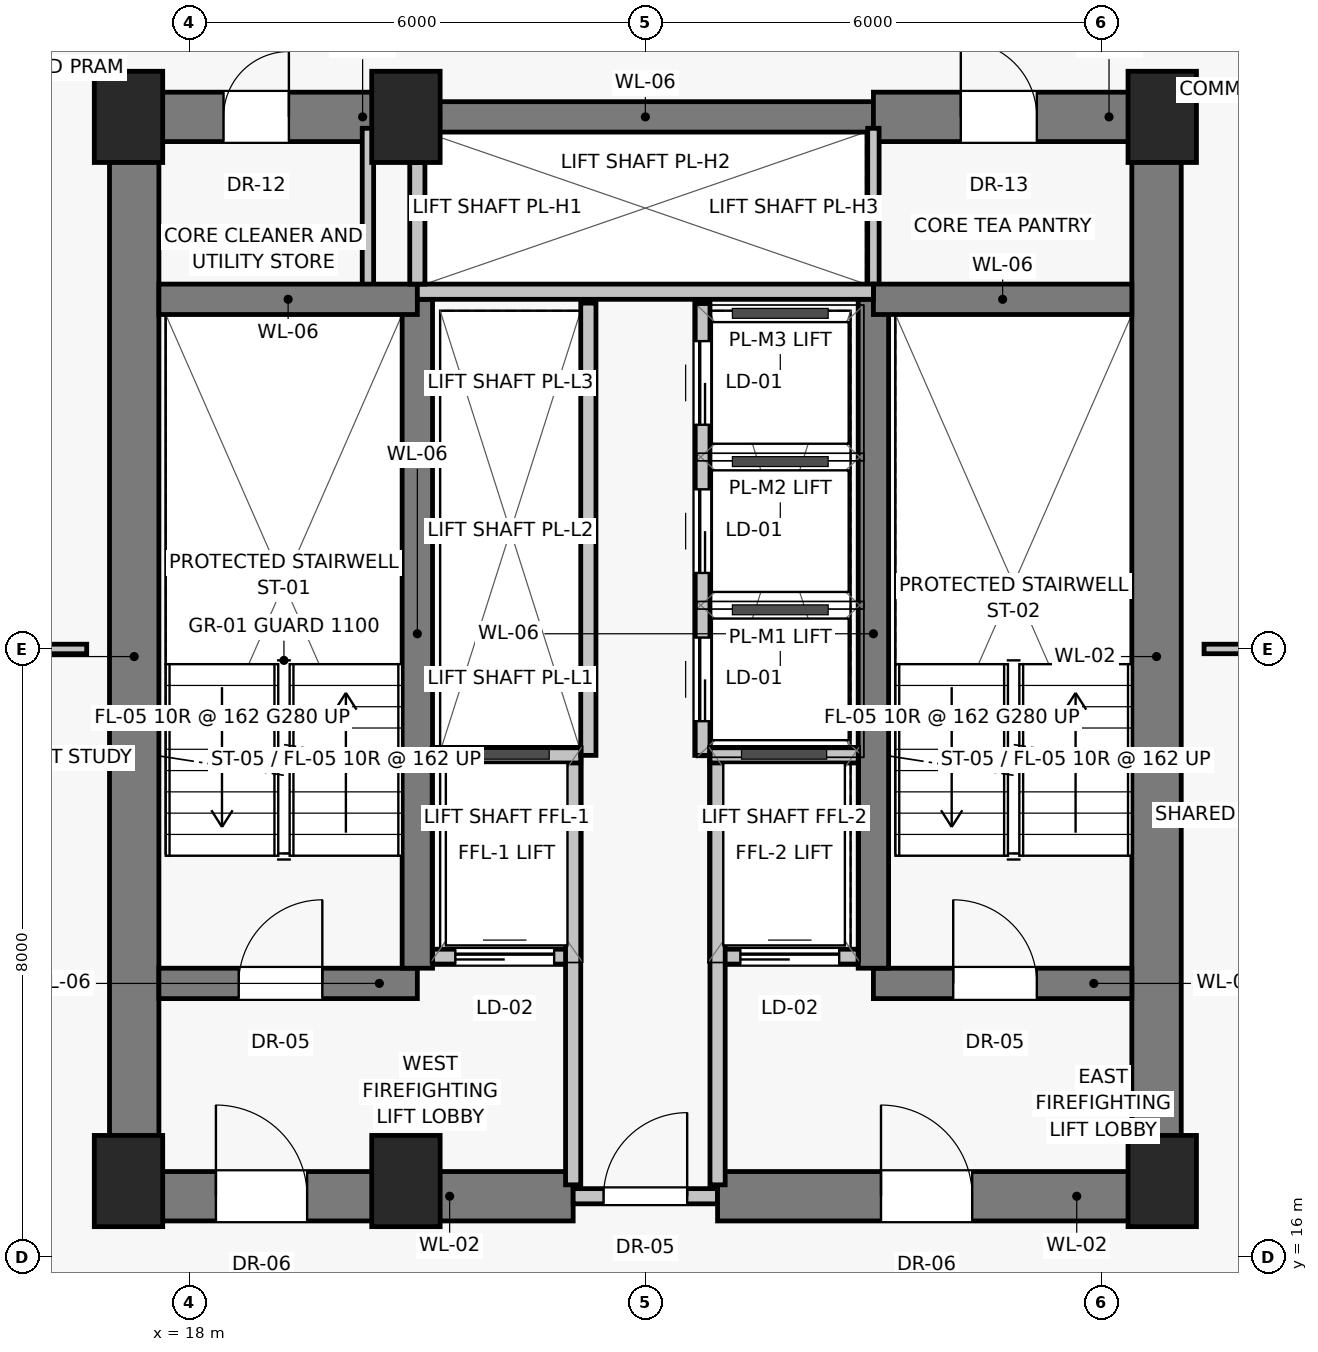
"""IFC4 building model, lengths in metres.
Left out: names, types, materials, properties, quantities, classifications, styles, units other than length and angle.
Written with IfcOpenShell. Run it as: python <this file> out.ifc"""

import sys

from ifc_helpers import new_model, si_unit, direction, frame, frame_2d, origin, origin_2d, place, context, subcontext, project, spatial, rectangle, extrude, source, transform, mapped, element, fill, save


model = new_model("IFC4")
c1 = context("Model", 3, precision=1e-05, world=origin(), true_north=direction((0.0, 1.0)))
c2 = subcontext(c1, "Body", "Model", "MODEL_VIEW")
j1 = project(units=[si_unit("LENGTHUNIT", "METRE"), si_unit("PLANEANGLEUNIT", "RADIAN")], contexts=[c1])
p1 = place(None, origin())
s1 = spatial("IfcSite", under=j1, at=p1, CompositionType="ELEMENT")
p2 = place(p1, origin())
s2 = spatial("IfcBuilding", under=s1, at=p2, CompositionType="ELEMENT")
p3 = place(p2, frame((0.0, 0.0, 92.7)))
s3 = spatial("IfcBuildingStorey", under=s2, at=p3, CompositionType="ELEMENT", Elevation=92.7)
for number, where, z_axis, x_axis in (
    (1, (17.2, 17.0, 0.0), (0.0, 0.0, 1.0), (1.0, 0.0, 0.0)),
    (2, (20.85, 17.0, 0.0), (0.0, 0.0, 1.0), (1.0, 0.0, 0.0)),
    (3, (30.8, 17.0, 0.0), (0.0, 0.0, 1.0), (1.0, 0.0, 0.0)),
    (4, (17.2, 31.0, 0.0), (0.0, 0.0, 1.0), (1.0, 0.0, 0.0)),
    (5, (20.85, 31.0, 0.0), (0.0, 0.0, 1.0), (1.0, 0.0, 0.0)),
    (6, (30.8, 31.0, 0.0), (0.0, 0.0, 1.0), (1.0, 0.0, 0.0)),
):
    element("IfcColumn", number, at=place(p3, frame(where, z_axis=z_axis, x_axis=x_axis)), inside=s3, PredefinedType="PILASTER", context=c2, shape_type="SweptSolid", body=[
        extrude(rectangle(XDim=0.9, YDim=1.2, at=origin_2d()), origin(), (0.0, 0.0, 1.0), 3.25),
    ])
for number, where, z_axis, x_axis in (
    (7, (17.275, 16.8, 0.0), (0.0, 0.0, 1.0), (0.0, 1.0, 0.0)),
    (8, (30.725, 16.8, 0.0), (0.0, 0.0, 1.0), (0.0, 1.0, 0.0)),
):
    element("IfcWall", number, at=place(p3, frame(where, z_axis=z_axis, x_axis=x_axis)), inside=s3, PredefinedType="SHEAR", context=c2, shape_type="SweptSolid", body=[
        extrude(rectangle(XDim=14.2, YDim=0.65, at=frame_2d((7.1, 0.0))), origin(), (0.0, 0.0, 1.0), 3.0),
    ])
p4 = place(p3, frame((17.2, 16.8, 0.0), z_axis=(0.0, 0.0, 1.0), x_axis=(1.0, 0.0, 0.0)))
e9 = element("IfcWall", 9, at=p4, inside=s3, PredefinedType="SHEAR", context=c2, shape_type="SweptSolid", body=[
    extrude(rectangle(XDim=5.85, YDim=0.65, at=frame_2d((2.925, 0.0))), origin(), (0.0, 0.0, 1.0), 3.0),
])
p5 = place(p4, frame((1.15, 0.0, 0.0)))
e10 = element("IfcOpeningElement", 10, at=p5, cuts=e9, PredefinedType="OPENING", context=c2, shape_type="SweptSolid", body=[
    extrude(rectangle(XDim=1.2, YDim=2.03, at=frame_2d((0.6, 1.015))), frame((0.0, 0.335, 0.0), z_axis=(0.0, -1.0, 0.0), x_axis=(1.0, 0.0, 0.0)), (0.0, 0.0, 1.0), 0.67),
])
p6 = place(p3, frame((23.05, 16.8, 0.0), z_axis=(0.0, 0.0, 1.0), x_axis=(1.0, 0.0, 0.0)))
e11 = element("IfcWall", 11, at=p6, inside=s3, PredefinedType="SOLIDWALL", context=c2, shape_type="SweptSolid", body=[
    extrude(rectangle(XDim=1.9, YDim=0.2, at=frame_2d((0.95, 0.0))), origin(), (0.0, 0.0, 1.0), 2.15),
])
p7 = place(p6, frame((0.4, 0.0, 0.0)))
e12 = element("IfcOpeningElement", 12, at=p7, cuts=e11, PredefinedType="OPENING", context=c2, shape_type="SweptSolid", body=[
    extrude(rectangle(XDim=1.1, YDim=2.03, at=frame_2d((0.55, 1.015))), frame((0.0, 0.11, 0.0), z_axis=(0.0, -1.0, 0.0), x_axis=(1.0, 0.0, 0.0)), (0.0, 0.0, 1.0), 0.22),
])
p8 = place(p3, frame((24.95, 16.8, 0.0), z_axis=(0.0, 0.0, 1.0), x_axis=(1.0, 0.0, 0.0)))
e13 = element("IfcWall", 13, at=p8, inside=s3, PredefinedType="SHEAR", context=c2, shape_type="SweptSolid", body=[
    extrude(rectangle(XDim=5.85, YDim=0.65, at=frame_2d((2.925, 0.0))), origin(), (0.0, 0.0, 1.0), 3.0),
])
p9 = place(p8, frame((2.15, 0.0, 0.0)))
e14 = element("IfcOpeningElement", 14, at=p9, cuts=e13, PredefinedType="OPENING", context=c2, shape_type="SweptSolid", body=[
    extrude(rectangle(XDim=1.2, YDim=2.03, at=frame_2d((0.6, 1.015))), frame((0.0, 0.335, 0.0), z_axis=(0.0, -1.0, 0.0), x_axis=(1.0, 0.0, 0.0)), (0.0, 0.0, 1.0), 0.67),
])
p10 = place(p3, frame((17.2, 31.0, 0.0), z_axis=(0.0, 0.0, 1.0), x_axis=(1.0, 0.0, 0.0)))
e15 = element("IfcWall", 15, at=p10, inside=s3, PredefinedType="SHEAR", context=c2, shape_type="SweptSolid", body=[
    extrude(rectangle(XDim=3.8, YDim=0.65, at=frame_2d((1.9, 0.0))), origin(), (0.0, 0.0, 1.0), 3.0),
])
p11 = place(p10, frame((1.25, 0.0, 0.0)))
e16 = element("IfcOpeningElement", 16, at=p11, cuts=e15, PredefinedType="OPENING", context=c2, shape_type="SweptSolid", body=[
    extrude(rectangle(XDim=0.86, YDim=2.01, at=frame_2d((0.43, 1.005))), frame((0.0, 0.335, 0.0), z_axis=(0.0, -1.0, 0.0), x_axis=(1.0, 0.0, 0.0)), (0.0, 0.0, 1.0), 0.67),
])
p12 = place(p3, frame((21.0, 31.0, 0.0), z_axis=(0.0, 0.0, 1.0), x_axis=(1.0, 0.0, 0.0)))
e17 = element("IfcWall", 17, at=p12, inside=s3, PredefinedType="SHEAR", context=c2, shape_type="SweptSolid", body=[
    extrude(rectangle(XDim=6.0, YDim=0.4, at=frame_2d((3.0, 0.0))), origin(), (0.0, 0.0, 1.0), 3.0),
])
p13 = place(p3, frame((27.0, 31.0, 0.0), z_axis=(0.0, 0.0, 1.0), x_axis=(1.0, 0.0, 0.0)))
e18 = element("IfcWall", 18, at=p13, inside=s3, PredefinedType="SHEAR", context=c2, shape_type="SweptSolid", body=[
    extrude(rectangle(XDim=3.8, YDim=0.65, at=frame_2d((1.9, 0.0))), origin(), (0.0, 0.0, 1.0), 3.0),
])
p14 = place(p13, frame((1.15, 0.0, 0.0)))
e19 = element("IfcOpeningElement", 19, at=p14, cuts=e18, PredefinedType="OPENING", context=c2, shape_type="SweptSolid", body=[
    extrude(rectangle(XDim=1.0, YDim=2.01, at=frame_2d((0.5, 1.005))), frame((0.0, 0.335, 0.0), z_axis=(0.0, -1.0, 0.0), x_axis=(1.0, 0.0, 0.0)), (0.0, 0.0, 1.0), 0.67),
])
for number, where, z_axis, x_axis in (
    (20, (20.35, 28.65, 0.0), (0.0, 0.0, 1.0), (0.0, 1.0, 0.0)),
    (21, (27.0, 28.65, 0.0), (0.0, 0.0, 1.0), (0.0, 1.0, 0.0)),
):
    element("IfcWall", number, at=place(p3, frame(where, z_axis=z_axis, x_axis=x_axis)), inside=s3, PredefinedType="PARTITIONING", context=c2, shape_type="SweptSolid", body=[
        extrude(rectangle(XDim=2.2, YDim=0.15, at=frame_2d((1.1, 0.0))), origin(), (0.0, 0.0, 1.0), 3.0),
    ])
p15 = place(p3, frame((17.6, 19.6, 0.0), z_axis=(0.0, 0.0, 1.0), x_axis=(1.0, 0.0, 0.0)))
e22 = element("IfcWall", 22, at=p15, inside=s3, PredefinedType="SHEAR", context=c2, shape_type="SweptSolid", body=[
    extrude(rectangle(XDim=3.4, YDim=0.4, at=frame_2d((1.7, 0.0))), origin(), (0.0, 0.0, 1.0), 3.0),
])
p16 = place(p15, frame((1.05, 0.0, 0.0)))
e23 = element("IfcOpeningElement", 23, at=p16, cuts=e22, PredefinedType="OPENING", context=c2, shape_type="SweptSolid", body=[
    extrude(rectangle(XDim=1.1, YDim=2.03, at=frame_2d((0.55, 1.015))), frame((0.0, 0.21, 0.0), z_axis=(0.0, -1.0, 0.0), x_axis=(1.0, 0.0, 0.0)), (0.0, 0.0, 1.0), 0.42),
])
p17 = place(p3, frame((21.2, 19.95, 0.0), z_axis=(0.0, 0.0, 1.0), x_axis=(1.0, 0.0, 0.0)))
e24 = element("IfcWall", 24, at=p17, inside=s3, PredefinedType="SOLIDWALL", context=c2, shape_type="SweptSolid", body=[
    extrude(rectangle(XDim=1.85, YDim=0.2, at=frame_2d((0.925, 0.0))), origin(), (0.0, 0.0, 1.0), 3.0),
])
p18 = place(p17, frame((0.3, 0.0, 0.0)))
e25 = element("IfcOpeningElement", 25, at=p18, cuts=e24, PredefinedType="OPENING", context=c2, shape_type="SweptSolid", body=[
    extrude(rectangle(XDim=1.3, YDim=2.25, at=frame_2d((0.65, 1.125))), frame((0.0, 0.11, 0.0), z_axis=(0.0, -1.0, 0.0), x_axis=(1.0, 0.0, 0.0)), (0.0, 0.0, 1.0), 0.22),
])
p19 = place(p3, frame((24.95, 19.95, 0.0), z_axis=(0.0, 0.0, 1.0), x_axis=(1.0, 0.0, 0.0)))
e26 = element("IfcWall", 26, at=p19, inside=s3, PredefinedType="SOLIDWALL", context=c2, shape_type="SweptSolid", body=[
    extrude(rectangle(XDim=1.85, YDim=0.2, at=frame_2d((0.925, 0.0))), origin(), (0.0, 0.0, 1.0), 3.0),
])
p20 = place(p19, frame((0.3, 0.0, 0.0)))
e27 = element("IfcOpeningElement", 27, at=p20, cuts=e26, PredefinedType="OPENING", context=c2, shape_type="SweptSolid", body=[
    extrude(rectangle(XDim=1.3, YDim=2.25, at=frame_2d((0.65, 1.125))), frame((0.0, 0.11, 0.0), z_axis=(0.0, -1.0, 0.0), x_axis=(1.0, 0.0, 0.0)), (0.0, 0.0, 1.0), 0.22),
])
p21 = place(p3, frame((27.0, 19.6, 0.0), z_axis=(0.0, 0.0, 1.0), x_axis=(1.0, 0.0, 0.0)))
e28 = element("IfcWall", 28, at=p21, inside=s3, PredefinedType="SHEAR", context=c2, shape_type="SweptSolid", body=[
    extrude(rectangle(XDim=3.4, YDim=0.4, at=frame_2d((1.7, 0.0))), origin(), (0.0, 0.0, 1.0), 3.0),
])
p22 = place(p21, frame((1.05, 0.0, 0.0)))
e29 = element("IfcOpeningElement", 29, at=p22, cuts=e28, PredefinedType="OPENING", context=c2, shape_type="SweptSolid", body=[
    extrude(rectangle(XDim=1.1, YDim=2.03, at=frame_2d((0.55, 1.015))), frame((0.0, 0.21, 0.0), z_axis=(0.0, -1.0, 0.0), x_axis=(1.0, 0.0, 0.0)), (0.0, 0.0, 1.0), 0.42),
])
for number, where, z_axis, x_axis in (
    (30, (21.0, 19.8, 0.0), (0.0, 0.0, 1.0), (0.0, 1.0, 0.0)),
    (31, (27.0, 19.8, 0.0), (0.0, 0.0, 1.0), (0.0, 1.0, 0.0)),
):
    element("IfcWall", number, at=place(p3, frame(where, z_axis=z_axis, x_axis=x_axis)), inside=s3, PredefinedType="SHEAR", context=c2, shape_type="SweptSolid", body=[
        extrude(rectangle(XDim=8.8, YDim=0.4, at=frame_2d((4.4, 0.0))), origin(), (0.0, 0.0, 1.0), 3.0),
    ])
for number, where, z_axis, x_axis in (
    (32, (17.6, 28.6, 0.0), (0.0, 0.0, 1.0), (1.0, 0.0, 0.0)),
    (33, (27.0, 28.6, 0.0), (0.0, 0.0, 1.0), (1.0, 0.0, 0.0)),
):
    element("IfcWall", number, at=place(p3, frame(where, z_axis=z_axis, x_axis=x_axis)), inside=s3, PredefinedType="SHEAR", context=c2, shape_type="SweptSolid", body=[
        extrude(rectangle(XDim=3.4, YDim=0.4, at=frame_2d((1.7, 0.0))), origin(), (0.0, 0.0, 1.0), 3.0),
    ])
for number, where, z_axis, x_axis in (
    (34, (23.05, 16.95, 0.0), (0.0, 0.0, 1.0), (0.0, 1.0, 0.0)),
    (35, (24.95, 16.95, 0.0), (0.0, 0.0, 1.0), (0.0, 1.0, 0.0)),
):
    element("IfcWall", number, at=place(p3, frame(where, z_axis=z_axis, x_axis=x_axis)), inside=s3, PredefinedType="SOLIDWALL", context=c2, shape_type="SweptSolid", body=[
        extrude(rectangle(XDim=5.6, YDim=0.2, at=frame_2d((2.8, 0.0))), origin(), (0.0, 0.0, 1.0), 3.0),
    ])
for number, where, z_axis, x_axis in (
    (36, (21.2, 22.6, 0.0), (0.0, 0.0, 1.0), (1.0, 0.0, 0.0)),
    (37, (24.85, 22.6, 0.0), (0.0, 0.0, 1.0), (1.0, 0.0, 0.0)),
):
    element("IfcWall", number, at=place(p3, frame(where, z_axis=z_axis, x_axis=x_axis)), inside=s3, PredefinedType="SOLIDWALL", context=c2, shape_type="SweptSolid", body=[
        extrude(rectangle(XDim=1.95, YDim=0.2, at=frame_2d((0.975, 0.0))), origin(), (0.0, 0.0, 1.0), 3.0),
    ])
p23 = place(p3, frame((21.0, 28.7, 0.0), z_axis=(0.0, 0.0, 1.0), x_axis=(1.0, 0.0, 0.0)))
e38 = element("IfcWall", 38, at=p23, inside=s3, PredefinedType="SOLIDWALL", context=c2, shape_type="SweptSolid", body=[
    extrude(rectangle(XDim=6.0, YDim=0.2, at=frame_2d((3.0, 0.0))), origin(), (0.0, 0.0, 1.0), 3.0),
])
p24 = place(p3, frame((21.0, 28.8, 0.0), z_axis=(0.0, 0.0, 1.0), x_axis=(0.0, 1.0, 0.0)))
e39 = element("IfcWall", 39, at=p24, inside=s3, PredefinedType="SOLIDWALL", context=c2, shape_type="SweptSolid", body=[
    extrude(rectangle(XDim=1.6, YDim=0.2, at=frame_2d((0.8, 0.0))), origin(), (0.0, 0.0, 1.0), 3.0),
])
p25 = place(p3, frame((23.25, 22.6, 0.0), z_axis=(0.0, 0.0, 1.0), x_axis=(0.0, 1.0, 0.0)))
e40 = element("IfcWall", 40, at=p25, inside=s3, PredefinedType="SOLIDWALL", context=c2, shape_type="SweptSolid", body=[
    extrude(rectangle(XDim=5.95, YDim=0.2, at=frame_2d((2.975, 0.0))), origin(), (0.0, 0.0, 1.0), 3.0),
])
p26 = place(p3, frame((24.75, 22.6, 0.0), z_axis=(0.0, 0.0, 1.0), x_axis=(0.0, 1.0, 0.0)))
e41 = element("IfcWall", 41, at=p26, inside=s3, PredefinedType="SOLIDWALL", context=c2, shape_type="SweptSolid", body=[
    extrude(rectangle(XDim=5.95, YDim=0.2, at=frame_2d((2.975, 0.0))), origin(), (0.0, 0.0, 1.0), 3.0),
])
p27 = place(p26, frame((0.45, 0.0, 0.0)))
e42 = element("IfcOpeningElement", 42, at=p27, cuts=e41, PredefinedType="OPENING", context=c2, shape_type="SweptSolid", body=[
    extrude(rectangle(XDim=1.1, YDim=2.08, at=frame_2d((0.55, 1.04))), frame((0.0, 0.11, 0.0), z_axis=(0.0, -1.0, 0.0), x_axis=(1.0, 0.0, 0.0)), (0.0, 0.0, 1.0), 0.22),
])
p28 = place(p26, frame((2.4, 0.0, 0.0)))
e43 = element("IfcOpeningElement", 43, at=p28, cuts=e41, PredefinedType="OPENING", context=c2, shape_type="SweptSolid", body=[
    extrude(rectangle(XDim=1.1, YDim=2.08, at=frame_2d((0.55, 1.04))), frame((0.0, 0.11, 0.0), z_axis=(0.0, -1.0, 0.0), x_axis=(1.0, 0.0, 0.0)), (0.0, 0.0, 1.0), 0.22),
])
p29 = place(p26, frame((4.35, 0.0, 0.0)))
e44 = element("IfcOpeningElement", 44, at=p29, cuts=e41, PredefinedType="OPENING", context=c2, shape_type="SweptSolid", body=[
    extrude(rectangle(XDim=1.1, YDim=2.08, at=frame_2d((0.55, 1.04))), frame((0.0, 0.11, 0.0), z_axis=(0.0, -1.0, 0.0), x_axis=(1.0, 0.0, 0.0)), (0.0, 0.0, 1.0), 0.22),
])
for number, where, z_axis, x_axis in (
    (45, (14.55, 24.0, 0.0), (0.0, 0.0, 1.0), (1.0, 0.0, 0.0)),
    (46, (31.35, 24.0, 0.0), (0.0, 0.0, 1.0), (1.0, 0.0, 0.0)),
):
    element("IfcWall", number, at=place(p3, frame(where, z_axis=z_axis, x_axis=x_axis)), inside=s3, PredefinedType="PARTITIONING", context=c2, shape_type="SweptSolid", body=[
        extrude(rectangle(XDim=2.1, YDim=0.125, at=frame_2d((1.05, 0.0))), origin(), (0.0, 0.0, 1.0), 3.0),
    ])
m1 = source(origin(), c2, "Body", "SweptSolid", [
    extrude(rectangle(XDim=1.2, YDim=2.03, at=frame_2d((0.6, 1.015))), frame((0.0, 0.025, 0.0), z_axis=(0.0, -1.0, 0.0), x_axis=(1.0, 0.0, 0.0)), (0.0, 0.0, 1.0), 0.05),
])
p30 = place(p5, origin())
e47 = element("IfcDoor", 47, at=p30, inside=s3, OperationType="SINGLE_SWING_LEFT", PredefinedType="DOOR", context=c2, shape_type="MappedRepresentation", body=[
    mapped(m1, transform((0.0, 0.0, 0.0), scale=1.0)),
])
fill(e10, e47)
m2 = source(origin(), c2, "Body", "SweptSolid", [
    extrude(rectangle(XDim=1.1, YDim=2.03, at=frame_2d((0.55, 1.015))), frame((0.0, 0.025, 0.0), z_axis=(0.0, -1.0, 0.0), x_axis=(1.0, 0.0, 0.0)), (0.0, 0.0, 1.0), 0.05),
])
p31 = place(p7, origin())
e48 = element("IfcDoor", 48, at=p31, inside=s3, OperationType="SINGLE_SWING_RIGHT", PredefinedType="DOOR", context=c2, shape_type="MappedRepresentation", body=[
    mapped(m2, transform((0.0, 0.0, 0.0), scale=1.0)),
])
fill(e12, e48)
p32 = place(p9, origin())
e49 = element("IfcDoor", 49, at=p32, inside=s3, OperationType="SINGLE_SWING_LEFT", PredefinedType="DOOR", context=c2, shape_type="MappedRepresentation", body=[
    mapped(m1, transform((0.0, 0.0, 0.0), scale=1.0)),
])
fill(e14, e49)
m3 = source(origin(), c2, "Body", "SweptSolid", [
    extrude(rectangle(XDim=0.86, YDim=2.01, at=frame_2d((0.43, 1.005))), frame((0.0, 0.025, 0.0), z_axis=(0.0, -1.0, 0.0), x_axis=(1.0, 0.0, 0.0)), (0.0, 0.0, 1.0), 0.05),
])
p33 = place(p11, origin())
e50 = element("IfcDoor", 50, at=p33, inside=s3, OperationType="SINGLE_SWING_RIGHT", PredefinedType="DOOR", context=c2, shape_type="MappedRepresentation", body=[
    mapped(m3, transform((0.0, 0.0, 0.0), scale=1.0)),
])
fill(e16, e50)
m4 = source(origin(), c2, "Body", "SweptSolid", [
    extrude(rectangle(XDim=1.0, YDim=2.01, at=frame_2d((0.5, 1.005))), frame((0.0, 0.025, 0.0), z_axis=(0.0, -1.0, 0.0), x_axis=(1.0, 0.0, 0.0)), (0.0, 0.0, 1.0), 0.05),
])
p34 = place(p14, origin())
e51 = element("IfcDoor", 51, at=p34, inside=s3, OperationType="SINGLE_SWING_LEFT", PredefinedType="DOOR", context=c2, shape_type="MappedRepresentation", body=[
    mapped(m4, transform((0.0, 0.0, 0.0), scale=1.0)),
])
fill(e19, e51)
p35 = place(p16, origin())
e52 = element("IfcDoor", 52, at=p35, inside=s3, OperationType="SINGLE_SWING_RIGHT", PredefinedType="DOOR", context=c2, shape_type="MappedRepresentation", body=[
    mapped(m2, transform((0.0, 0.0, 0.0), scale=1.0)),
])
fill(e23, e52)
m5 = source(origin(), c2, "Body", "SweptSolid", [
    extrude(rectangle(XDim=1.3, YDim=2.25, at=frame_2d((0.65, 1.125))), frame((0.0, 0.025, 0.0), z_axis=(0.0, -1.0, 0.0), x_axis=(1.0, 0.0, 0.0)), (0.0, 0.0, 1.0), 0.05),
])
p36 = place(p18, origin())
e53 = element("IfcDoor", 53, at=p36, inside=s3, OperationType="SLIDING_TO_LEFT", PredefinedType="DOOR", context=c2, shape_type="MappedRepresentation", body=[
    mapped(m5, transform((0.0, 0.0, 0.0), scale=1.0)),
])
fill(e25, e53)
p37 = place(p20, origin())
e54 = element("IfcDoor", 54, at=p37, inside=s3, OperationType="SLIDING_TO_LEFT", PredefinedType="DOOR", context=c2, shape_type="MappedRepresentation", body=[
    mapped(m5, transform((0.0, 0.0, 0.0), scale=1.0)),
])
fill(e27, e54)
p38 = place(p22, origin())
e55 = element("IfcDoor", 55, at=p38, inside=s3, OperationType="SINGLE_SWING_LEFT", PredefinedType="DOOR", context=c2, shape_type="MappedRepresentation", body=[
    mapped(m2, transform((0.0, 0.0, 0.0), scale=1.0)),
])
fill(e29, e55)
m6 = source(origin(), c2, "Body", "SweptSolid", [
    extrude(rectangle(XDim=1.1, YDim=2.08, at=frame_2d((0.55, 1.04))), frame((0.0, 0.025, 0.0), z_axis=(0.0, -1.0, 0.0), x_axis=(1.0, 0.0, 0.0)), (0.0, 0.0, 1.0), 0.05),
])
p39 = place(p27, origin())
e56 = element("IfcDoor", 56, at=p39, inside=s3, OperationType="SLIDING_TO_LEFT", PredefinedType="DOOR", context=c2, shape_type="MappedRepresentation", body=[
    mapped(m6, transform((0.0, 0.0, 0.0), scale=1.0)),
])
fill(e42, e56)
p40 = place(p28, origin())
e57 = element("IfcDoor", 57, at=p40, inside=s3, OperationType="SLIDING_TO_LEFT", PredefinedType="DOOR", context=c2, shape_type="MappedRepresentation", body=[
    mapped(m6, transform((0.0, 0.0, 0.0), scale=1.0)),
])
fill(e43, e57)
p41 = place(p29, origin())
e58 = element("IfcDoor", 58, at=p41, inside=s3, OperationType="SLIDING_TO_LEFT", PredefinedType="DOOR", context=c2, shape_type="MappedRepresentation", body=[
    mapped(m6, transform((0.0, 0.0, 0.0), scale=1.0)),
])
fill(e44, e58)
save(model, sys.argv[1])
